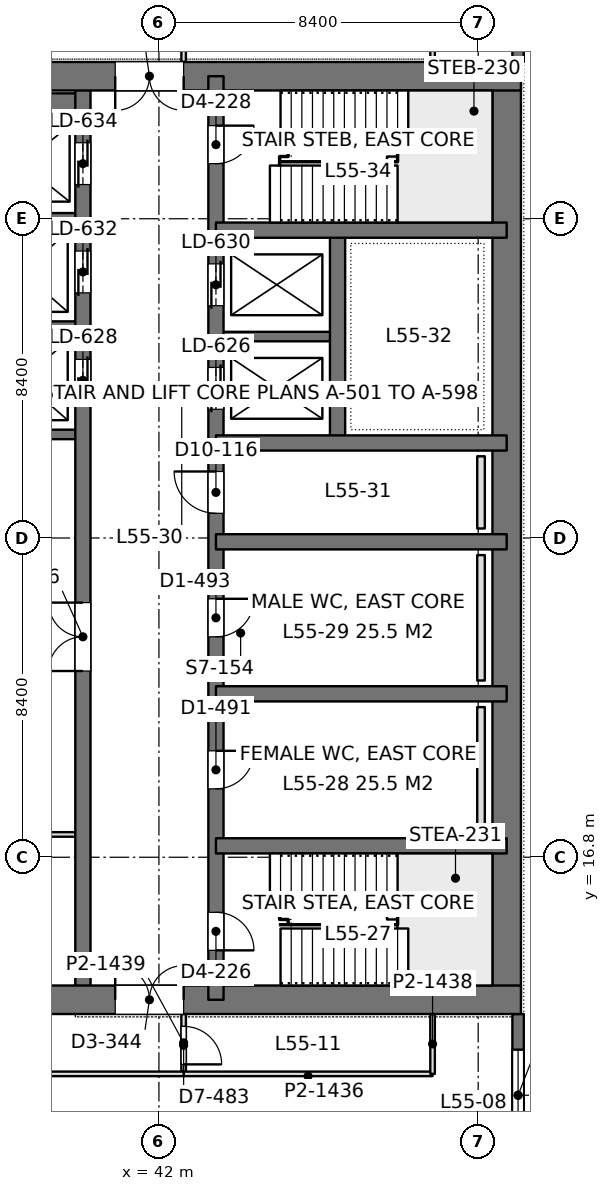
"""IFC4 building model, lengths in metres.
Left out: names, types, materials, properties, quantities, classifications, styles, units other than length and angle.
Written with IfcOpenShell. Run it as: python <this file> out.ifc"""

import sys

from ifc_helpers import new_model, si_unit, direction, frame, frame_2d, origin, place, context, subcontext, project, spatial, rectangle, extrude, element, fill, save


model = new_model("IFC4")
c1 = context("Model", 3, precision=1e-05, world=origin(), true_north=direction((0.0, 1.0)))
c2 = subcontext(c1, "Body", "Model", "MODEL_VIEW")
j1 = project(units=[si_unit("LENGTHUNIT", "METRE"), si_unit("PLANEANGLEUNIT", "RADIAN")], contexts=[c1])
p1 = place(None, origin())
s1 = spatial("IfcSite", under=j1, at=p1, CompositionType="ELEMENT")
p2 = place(p1, origin())
s2 = spatial("IfcBuilding", under=s1, at=p2, CompositionType="ELEMENT")
p3 = place(p2, frame((0.0, 0.0, 240.6)))
s3 = spatial("IfcBuildingStorey", under=s2, at=p3, CompositionType="ELEMENT", Elevation=240.6)
p4 = place(p3, frame((33.675, 13.05, 0.0), z_axis=(0.0, 0.0, 1.0), x_axis=(1.0, 0.0, 0.0)))
e1 = element("IfcWall", 1, at=p4, inside=s3, PredefinedType="SHEAR", context=c2, shape_type="SweptSolid", body=[
    extrude(rectangle(XDim=17.85, YDim=0.75, at=frame_2d((8.925, 0.0))), origin(), (0.0, 0.0, 1.0), 4.2),
])
p5 = place(p4, frame((7.175, 0.0, 0.0)))
e2 = element("IfcOpeningElement", 2, at=p5, cuts=e1, PredefinedType="OPENING", context=c2, shape_type="SweptSolid", body=[
    extrude(rectangle(XDim=1.8, YDim=2.4, at=frame_2d((0.9, 1.2))), frame((0.0, 0.385, 0.0), z_axis=(0.0, -1.0, 0.0), x_axis=(1.0, 0.0, 0.0)), (0.0, 0.0, 1.0), 0.77),
])
p6 = place(p3, frame((33.675, 37.35, 0.0), z_axis=(0.0, 0.0, 1.0), x_axis=(1.0, 0.0, 0.0)))
e3 = element("IfcWall", 3, at=p6, inside=s3, PredefinedType="SHEAR", context=c2, shape_type="SweptSolid", body=[
    extrude(rectangle(XDim=17.85, YDim=0.75, at=frame_2d((8.925, 0.0))), origin(), (0.0, 0.0, 1.0), 4.2),
])
p7 = place(p6, frame((7.175, 0.0, 0.0)))
e4 = element("IfcOpeningElement", 4, at=p7, cuts=e3, PredefinedType="OPENING", context=c2, shape_type="SweptSolid", body=[
    extrude(rectangle(XDim=1.8, YDim=2.4, at=frame_2d((0.9, 1.2))), frame((0.0, 0.385, 0.0), z_axis=(0.0, -1.0, 0.0), x_axis=(1.0, 0.0, 0.0)), (0.0, 0.0, 1.0), 0.77),
])
p8 = place(p3, frame((51.15, 13.05, 0.0), z_axis=(0.0, 0.0, 1.0), x_axis=(0.0, 1.0, 0.0)))
e5 = element("IfcWall", 5, at=p8, inside=s3, PredefinedType="SHEAR", context=c2, shape_type="SweptSolid", body=[
    extrude(rectangle(XDim=24.3, YDim=0.75, at=frame_2d((12.15, 0.0))), origin(), (0.0, 0.0, 1.0), 4.2),
])
p9 = place(p3, frame((43.5, 13.05, 0.0), z_axis=(0.0, 0.0, 1.0), x_axis=(0.0, 1.0, 0.0)))
e6 = element("IfcWall", 6, at=p9, inside=s3, PredefinedType="SHEAR", context=c2, shape_type="SweptSolid", body=[
    extrude(rectangle(XDim=24.3, YDim=0.4, at=frame_2d((12.15, 0.0))), origin(), (0.0, 0.0, 1.0), 4.2),
])
p10 = place(p9, frame((1.3, 0.0, 0.0)))
e7 = element("IfcOpeningElement", 7, at=p10, cuts=e6, PredefinedType="OPENING", context=c2, shape_type="SweptSolid", body=[
    extrude(rectangle(XDim=1.0, YDim=2.2, at=frame_2d((0.5, 1.1))), frame((0.0, 0.21, 0.0), z_axis=(0.0, -1.0, 0.0), x_axis=(1.0, 0.0, 0.0)), (0.0, 0.0, 1.0), 0.42),
])
p11 = place(p9, frame((22.0, 0.0, 0.0)))
e8 = element("IfcOpeningElement", 8, at=p11, cuts=e6, PredefinedType="OPENING", context=c2, shape_type="SweptSolid", body=[
    extrude(rectangle(XDim=1.0, YDim=2.2, at=frame_2d((0.5, 1.1))), frame((0.0, 0.21, 0.0), z_axis=(0.0, -1.0, 0.0), x_axis=(1.0, 0.0, 0.0)), (0.0, 0.0, 1.0), 0.42),
])
p12 = place(p9, frame((5.55, 0.0, 0.0)))
e9 = element("IfcOpeningElement", 9, at=p12, cuts=e6, PredefinedType="OPENING", context=c2, shape_type="SweptSolid", body=[
    extrude(rectangle(XDim=1.0, YDim=2.2, at=frame_2d((0.5, 1.1))), frame((0.0, 0.21, 0.0), z_axis=(0.0, -1.0, 0.0), x_axis=(1.0, 0.0, 0.0)), (0.0, 0.0, 1.0), 0.42),
])
p13 = place(p9, frame((9.55, 0.0, 0.0)))
e10 = element("IfcOpeningElement", 10, at=p13, cuts=e6, PredefinedType="OPENING", context=c2, shape_type="SweptSolid", body=[
    extrude(rectangle(XDim=1.0, YDim=2.2, at=frame_2d((0.5, 1.1))), frame((0.0, 0.21, 0.0), z_axis=(0.0, -1.0, 0.0), x_axis=(1.0, 0.0, 0.0)), (0.0, 0.0, 1.0), 0.42),
])
p14 = place(p9, frame((12.8, 0.0, 0.0)))
e11 = element("IfcOpeningElement", 11, at=p14, cuts=e6, PredefinedType="OPENING", context=c2, shape_type="SweptSolid", body=[
    extrude(rectangle(XDim=1.1, YDim=2.2, at=frame_2d((0.55, 1.1))), frame((0.0, 0.21, 0.0), z_axis=(0.0, -1.0, 0.0), x_axis=(1.0, 0.0, 0.0)), (0.0, 0.0, 1.0), 0.42),
])
p15 = place(p9, frame((15.538, 0.0, 0.0)))
e12 = element("IfcOpeningElement", 12, at=p15, cuts=e6, PredefinedType="OPENING", context=c2, shape_type="SweptSolid", body=[
    extrude(rectangle(XDim=1.1, YDim=2.2, at=frame_2d((0.55, 1.1))), frame((0.0, 0.21, 0.0), z_axis=(0.0, -1.0, 0.0), x_axis=(1.0, 0.0, 0.0)), (0.0, 0.0, 1.0), 0.42),
])
p16 = place(p9, frame((18.262, 0.0, 0.0)))
e13 = element("IfcOpeningElement", 13, at=p16, cuts=e6, PredefinedType="OPENING", context=c2, shape_type="SweptSolid", body=[
    extrude(rectangle(XDim=1.1, YDim=2.2, at=frame_2d((0.55, 1.1))), frame((0.0, 0.21, 0.0), z_axis=(0.0, -1.0, 0.0), x_axis=(1.0, 0.0, 0.0)), (0.0, 0.0, 1.0), 0.42),
])
p17 = place(p3, frame((40.0, 13.05, 0.0), z_axis=(0.0, 0.0, 1.0), x_axis=(0.0, 1.0, 0.0)))
e14 = element("IfcWall", 14, at=p17, inside=s3, PredefinedType="SHEAR", context=c2, shape_type="SweptSolid", body=[
    extrude(rectangle(XDim=24.3, YDim=0.4, at=frame_2d((12.15, 0.0))), origin(), (0.0, 0.0, 1.0), 4.2),
])
p18 = place(p17, frame((15.75, 0.0, 0.0)))
e15 = element("IfcOpeningElement", 15, at=p18, cuts=e14, PredefinedType="OPENING", context=c2, shape_type="SweptSolid", body=[
    extrude(rectangle(XDim=1.1, YDim=2.2, at=frame_2d((0.55, 1.1))), frame((0.0, 0.21, 0.0), z_axis=(0.0, -1.0, 0.0), x_axis=(1.0, 0.0, 0.0)), (0.0, 0.0, 1.0), 0.42),
])
p19 = place(p17, frame((18.6, 0.0, 0.0)))
e16 = element("IfcOpeningElement", 16, at=p19, cuts=e14, PredefinedType="OPENING", context=c2, shape_type="SweptSolid", body=[
    extrude(rectangle(XDim=1.1, YDim=2.2, at=frame_2d((0.55, 1.1))), frame((0.0, 0.21, 0.0), z_axis=(0.0, -1.0, 0.0), x_axis=(1.0, 0.0, 0.0)), (0.0, 0.0, 1.0), 0.42),
])
p20 = place(p17, frame((21.45, 0.0, 0.0)))
e17 = element("IfcOpeningElement", 17, at=p20, cuts=e14, PredefinedType="OPENING", context=c2, shape_type="SweptSolid", body=[
    extrude(rectangle(XDim=1.1, YDim=2.2, at=frame_2d((0.55, 1.1))), frame((0.0, 0.21, 0.0), z_axis=(0.0, -1.0, 0.0), x_axis=(1.0, 0.0, 0.0)), (0.0, 0.0, 1.0), 0.42),
])
p21 = place(p17, frame((8.65, 0.0, 0.0)))
e18 = element("IfcOpeningElement", 18, at=p21, cuts=e14, PredefinedType="OPENING", context=c2, shape_type="SweptSolid", body=[
    extrude(rectangle(XDim=1.8, YDim=2.4, at=frame_2d((0.9, 1.2))), frame((0.0, 0.21, 0.0), z_axis=(0.0, -1.0, 0.0), x_axis=(1.0, 0.0, 0.0)), (0.0, 0.0, 1.0), 0.42),
])
for number, where, z_axis, x_axis in (
    (19, (51.15, 17.1, 0.0), (0.0, 0.0, 1.0), (-1.0, 0.0, 0.0)),
    (20, (51.15, 21.1, 0.0), (0.0, 0.0, 1.0), (-1.0, 0.0, 0.0)),
    (21, (51.15, 25.1, 0.0), (0.0, 0.0, 1.0), (-1.0, 0.0, 0.0)),
    (22, (51.15, 27.7, 0.0), (0.0, 0.0, 1.0), (-1.0, 0.0, 0.0)),
    (23, (51.15, 33.3, 0.0), (0.0, 0.0, 1.0), (-1.0, 0.0, 0.0)),
):
    element("IfcWall", number, at=place(p3, frame(where, z_axis=z_axis, x_axis=x_axis)), inside=s3, PredefinedType="SHEAR", context=c2, shape_type="SweptSolid", body=[
        extrude(rectangle(XDim=7.65, YDim=0.4, at=frame_2d((3.825, 0.0))), origin(), (0.0, 0.0, 1.0), 4.2),
    ])
p22 = place(p3, frame((46.7, 27.7, 0.0), z_axis=(0.0, 0.0, 1.0), x_axis=(0.0, 1.0, 0.0)))
e24 = element("IfcWall", 24, at=p22, inside=s3, PredefinedType="SHEAR", context=c2, shape_type="SweptSolid", body=[
    extrude(rectangle(XDim=5.6, YDim=0.4, at=frame_2d((2.8, 0.0))), origin(), (0.0, 0.0, 1.0), 4.2),
])
p23 = place(p3, frame((46.7, 30.5, 0.0), z_axis=(0.0, 0.0, 1.0), x_axis=(-1.0, 0.0, 0.0)))
e25 = element("IfcWall", 25, at=p23, inside=s3, PredefinedType="SHEAR", context=c2, shape_type="SweptSolid", body=[
    extrude(rectangle(XDim=3.2, YDim=0.25, at=frame_2d((1.6, 0.0))), origin(), (0.0, 0.0, 1.0), 4.2),
])
p24 = place(p3, frame((40.0, 27.925, 0.0), z_axis=(0.0, 0.0, 1.0), x_axis=(-1.0, 0.0, 0.0)))
e26 = element("IfcWall", 26, at=p24, inside=s3, PredefinedType="SHEAR", context=c2, shape_type="SweptSolid", body=[
    extrude(rectangle(XDim=5.95, YDim=0.25, at=frame_2d((2.975, 0.0))), origin(), (0.0, 0.0, 1.0), 4.2),
])
for number, where, z_axis, x_axis in (
    (27, (40.0, 30.775, 0.0), (0.0, 0.0, 1.0), (-1.0, 0.0, 0.0)),
    (28, (40.0, 33.625, 0.0), (0.0, 0.0, 1.0), (-1.0, 0.0, 0.0)),
):
    element("IfcWall", number, at=place(p3, frame(where, z_axis=z_axis, x_axis=x_axis)), inside=s3, PredefinedType="SHEAR", context=c2, shape_type="SweptSolid", body=[
        extrude(rectangle(XDim=3.2, YDim=0.25, at=frame_2d((1.6, 0.0))), origin(), (0.0, 0.0, 1.0), 4.2),
    ])
p25 = place(p3, frame((40.0, 36.625, 0.0), z_axis=(0.0, 0.0, 1.0), x_axis=(-1.0, 0.0, 0.0)))
e29 = element("IfcWall", 29, at=p25, inside=s3, PredefinedType="SHEAR", context=c2, shape_type="SweptSolid", body=[
    extrude(rectangle(XDim=3.2, YDim=0.55, at=frame_2d((1.6, 0.0))), origin(), (0.0, 0.0, 1.0), 4.2),
])
p26 = place(p3, frame((51.45, 42.0, 0.0), z_axis=(0.0, 0.0, 1.0), x_axis=(0.0, -1.0, 0.0)))
e30 = element("IfcWall", 30, at=p26, inside=s3, PredefinedType="SOLIDWALL", context=c2, shape_type="SweptSolid", body=[
    extrude(rectangle(XDim=4.275, YDim=0.3, at=frame_2d((2.137, 0.0))), origin(), (0.0, 0.0, 1.0), 4.0),
])
p27 = place(p26, frame((0.938, 0.0, 0.9)))
e31 = element("IfcOpeningElement", 31, at=p27, cuts=e30, PredefinedType="OPENING", context=c2, shape_type="SweptSolid", body=[
    extrude(rectangle(XDim=2.4, YDim=1.9, at=frame_2d((1.2, 0.95))), frame((0.0, 0.16, 0.0), z_axis=(0.0, -1.0, 0.0), x_axis=(1.0, 0.0, 0.0)), (0.0, 0.0, 1.0), 0.32),
])
p28 = place(p3, frame((51.45, 12.675, 0.0), z_axis=(0.0, 0.0, 1.0), x_axis=(0.0, -1.0, 0.0)))
e32 = element("IfcWall", 32, at=p28, inside=s3, PredefinedType="SOLIDWALL", context=c2, shape_type="SweptSolid", body=[
    extrude(rectangle(XDim=4.275, YDim=0.3, at=frame_2d((2.138, 0.0))), origin(), (0.0, 0.0, 1.0), 4.0),
])
p29 = place(p28, frame((0.938, 0.0, 0.9)))
e33 = element("IfcOpeningElement", 33, at=p29, cuts=e32, PredefinedType="OPENING", context=c2, shape_type="SweptSolid", body=[
    extrude(rectangle(XDim=2.4, YDim=1.9, at=frame_2d((1.2, 0.95))), frame((0.0, 0.16, 0.0), z_axis=(0.0, -1.0, 0.0), x_axis=(1.0, 0.0, 0.0)), (0.0, 0.0, 1.0), 0.32),
])
p30 = place(p3, frame((33.898, 17.4, 0.0), z_axis=(0.0, 0.0, 1.0), x_axis=(1.0, 0.0, 0.0)))
e34 = element("IfcWall", 34, at=p30, inside=s3, PredefinedType="PARTITIONING", context=c2, shape_type="SweptSolid", body=[
    extrude(rectangle(XDim=5.904, YDim=0.12, at=frame_2d((2.952, 0.0))), origin(), (0.0, 0.0, 1.0), 3.3),
])
p31 = place(p3, frame((1.2, 11.1, 0.0), z_axis=(0.0, 0.0, 1.0), x_axis=(1.0, 0.0, 0.0)))
e35 = element("IfcWall", 35, at=p31, inside=s3, PredefinedType="PARTITIONING", context=c2, shape_type="SweptSolid", body=[
    extrude(rectangle(XDim=41.452, YDim=0.12, at=frame_2d((20.726, 0.0))), origin(), (0.0, 0.0, 1.0), 3.3),
])
p32 = place(p31, frame((4.3, 0.0, 0.0)))
e36 = element("IfcOpeningElement", 36, at=p32, cuts=e35, PredefinedType="OPENING", context=c2, shape_type="SweptSolid", body=[
    extrude(rectangle(XDim=1.8, YDim=2.2, at=frame_2d((0.9, 1.1))), frame((0.0, 0.07, 0.0), z_axis=(0.0, -1.0, 0.0), x_axis=(1.0, 0.0, 0.0)), (0.0, 0.0, 1.0), 0.14),
])
p33 = place(p31, frame((9.5, 0.0, 0.0)))
e37 = element("IfcOpeningElement", 37, at=p33, cuts=e35, PredefinedType="OPENING", context=c2, shape_type="SweptSolid", body=[
    extrude(rectangle(XDim=1.8, YDim=2.2, at=frame_2d((0.9, 1.1))), frame((0.0, 0.07, 0.0), z_axis=(0.0, -1.0, 0.0), x_axis=(1.0, 0.0, 0.0)), (0.0, 0.0, 1.0), 0.14),
])
p34 = place(p31, frame((23.317, 0.0, 0.0)))
e38 = element("IfcOpeningElement", 38, at=p34, cuts=e35, PredefinedType="OPENING", context=c2, shape_type="SweptSolid", body=[
    extrude(rectangle(XDim=1.8, YDim=2.2, at=frame_2d((0.9, 1.1))), frame((0.0, 0.07, 0.0), z_axis=(0.0, -1.0, 0.0), x_axis=(1.0, 0.0, 0.0)), (0.0, 0.0, 1.0), 0.14),
])
p35 = place(p31, frame((33.0, 0.0, 0.0)))
e39 = element("IfcOpeningElement", 39, at=p35, cuts=e35, PredefinedType="OPENING", context=c2, shape_type="SweptSolid", body=[
    extrude(rectangle(XDim=1.8, YDim=2.2, at=frame_2d((0.9, 1.1))), frame((0.0, 0.07, 0.0), z_axis=(0.0, -1.0, 0.0), x_axis=(1.0, 0.0, 0.0)), (0.0, 0.0, 1.0), 0.14),
])
p36 = place(p3, frame((42.65, 11.158, 0.0), z_axis=(0.0, 0.0, 1.0), x_axis=(0.0, 1.0, 0.0)))
e40 = element("IfcWall", 40, at=p36, inside=s3, PredefinedType="PARTITIONING", context=c2, shape_type="SweptSolid", body=[
    extrude(rectangle(XDim=1.518, YDim=0.12, at=frame_2d((0.759, 0.0))), origin(), (0.0, 0.0, 1.0), 4.0),
])
p37 = place(p36, frame((0.192, 0.0, 0.0)))
e41 = element("IfcOpeningElement", 41, at=p37, cuts=e40, PredefinedType="OPENING", context=c2, shape_type="SweptSolid", body=[
    extrude(rectangle(XDim=1.0, YDim=2.4, at=frame_2d((0.5, 1.2))), frame((0.0, 0.07, 0.0), z_axis=(0.0, -1.0, 0.0), x_axis=(1.0, 0.0, 0.0)), (0.0, 0.0, 1.0), 0.14),
])
p38 = place(p3, frame((42.648, 11.1, 0.0), z_axis=(0.0, 0.0, 1.0), x_axis=(1.0, 0.0, 0.0)))
e42 = element("IfcWall", 42, at=p38, inside=s3, PredefinedType="PARTITIONING", context=c2, shape_type="SweptSolid", body=[
    extrude(rectangle(XDim=6.552, YDim=0.12, at=frame_2d((3.276, 0.0))), origin(), (0.0, 0.0, 1.0), 4.0),
])
p39 = place(p3, frame((49.2, 11.1, 0.0), z_axis=(0.0, 0.0, 1.0), x_axis=(0.0, 1.0, 0.0)))
e43 = element("IfcWall", 43, at=p39, inside=s3, PredefinedType="PARTITIONING", context=c2, shape_type="SweptSolid", body=[
    extrude(rectangle(XDim=1.576, YDim=0.12, at=frame_2d((0.788, 0.0))), origin(), (0.0, 0.0, 1.0), 4.0),
])
p40 = place(p3, frame((42.65, 37.724, 0.0), z_axis=(0.0, 0.0, 1.0), x_axis=(0.0, 1.0, 0.0)))
e44 = element("IfcWall", 44, at=p40, inside=s3, PredefinedType="PARTITIONING", context=c2, shape_type="SweptSolid", body=[
    extrude(rectangle(XDim=1.518, YDim=0.12, at=frame_2d((0.759, 0.0))), origin(), (0.0, 0.0, 1.0), 4.0),
])
p41 = place(p40, frame((0.326, 0.0, 0.0)))
e45 = element("IfcOpeningElement", 45, at=p41, cuts=e44, PredefinedType="OPENING", context=c2, shape_type="SweptSolid", body=[
    extrude(rectangle(XDim=1.0, YDim=2.4, at=frame_2d((0.5, 1.2))), frame((0.0, 0.07, 0.0), z_axis=(0.0, -1.0, 0.0), x_axis=(1.0, 0.0, 0.0)), (0.0, 0.0, 1.0), 0.14),
])
p42 = place(p3, frame((49.2, 37.724, 0.0), z_axis=(0.0, 0.0, 1.0), x_axis=(0.0, 1.0, 0.0)))
e46 = element("IfcWall", 46, at=p42, inside=s3, PredefinedType="PARTITIONING", context=c2, shape_type="SweptSolid", body=[
    extrude(rectangle(XDim=1.576, YDim=0.12, at=frame_2d((0.788, 0.0))), origin(), (0.0, 0.0, 1.0), 4.0),
])
for number, where, z_axis, x_axis in (
    (47, (50.475, 17.45, 0.0), (0.0, 0.0, 1.0), (0.0, 1.0, 0.0)),
    (48, (50.475, 21.45, 0.0), (0.0, 0.0, 1.0), (0.0, 1.0, 0.0)),
):
    element("IfcWall", number, at=place(p3, frame(where, z_axis=z_axis, x_axis=x_axis)), inside=s3, PredefinedType="PLUMBINGWALL", context=c2, shape_type="SweptSolid", body=[
        extrude(rectangle(XDim=3.3, YDim=0.2, at=frame_2d((1.65, 0.0))), origin(), (0.0, 0.0, 1.0), 1.2),
    ])
p43 = place(p3, frame((50.475, 25.45, 0.0), z_axis=(0.0, 0.0, 1.0), x_axis=(0.0, 1.0, 0.0)))
e49 = element("IfcWall", 49, at=p43, inside=s3, PredefinedType="PLUMBINGWALL", context=c2, shape_type="SweptSolid", body=[
    extrude(rectangle(XDim=1.9, YDim=0.2, at=frame_2d((0.95, 0.0))), origin(), (0.0, 0.0, 1.0), 1.2),
])
p44 = place(p29, origin())
e50 = element("IfcWindow", 50, at=p44, inside=s3, PartitioningType="SINGLE_PANEL", PredefinedType="WINDOW", context=c2, shape_type="SweptSolid", body=[
    extrude(rectangle(XDim=2.4, YDim=1.9, at=frame_2d((1.2, 0.95))), frame((0.0, 0.03, 0.0), z_axis=(0.0, -1.0, 0.0), x_axis=(1.0, 0.0, 0.0)), (0.0, 0.0, 1.0), 0.06),
])
fill(e33, e50)
p45 = place(p5, origin())
e51 = element("IfcDoor", 51, at=p45, inside=s3, OperationType="DOUBLE_DOOR_SINGLE_SWING", PredefinedType="DOOR", context=c2, shape_type="SweptSolid", body=[
    extrude(rectangle(XDim=1.8, YDim=2.4, at=frame_2d((0.9, 1.2))), frame((0.0, 0.025, 0.0), z_axis=(0.0, -1.0, 0.0), x_axis=(1.0, 0.0, 0.0)), (0.0, 0.0, 1.0), 0.05),
])
fill(e2, e51)
p46 = place(p7, frame((1.8, 0.0, 0.0), z_axis=(0.0, 0.0, 1.0), x_axis=(-1.0, 0.0, 0.0)))
e52 = element("IfcDoor", 52, at=p46, inside=s3, OperationType="DOUBLE_DOOR_SINGLE_SWING", PredefinedType="DOOR", context=c2, shape_type="SweptSolid", body=[
    extrude(rectangle(XDim=1.8, YDim=2.4, at=frame_2d((0.9, 1.2))), frame((0.0, 0.025, 0.0), z_axis=(0.0, -1.0, 0.0), x_axis=(1.0, 0.0, 0.0)), (0.0, 0.0, 1.0), 0.05),
])
fill(e4, e52)
p47 = place(p10, frame((1.0, 0.0, 0.0), z_axis=(0.0, 0.0, 1.0), x_axis=(-1.0, 0.0, 0.0)))
e53 = element("IfcDoor", 53, at=p47, inside=s3, OperationType="SINGLE_SWING_RIGHT", PredefinedType="DOOR", context=c2, shape_type="SweptSolid", body=[
    extrude(rectangle(XDim=1.0, YDim=2.2, at=frame_2d((0.5, 1.1))), frame((0.0, 0.025, 0.0), z_axis=(0.0, -1.0, 0.0), x_axis=(1.0, 0.0, 0.0)), (0.0, 0.0, 1.0), 0.05),
])
fill(e7, e53)
p48 = place(p11, frame((1.0, 0.0, 0.0), z_axis=(0.0, 0.0, 1.0), x_axis=(-1.0, 0.0, 0.0)))
e54 = element("IfcDoor", 54, at=p48, inside=s3, OperationType="SINGLE_SWING_LEFT", PredefinedType="DOOR", context=c2, shape_type="SweptSolid", body=[
    extrude(rectangle(XDim=1.0, YDim=2.2, at=frame_2d((0.5, 1.1))), frame((0.0, 0.025, 0.0), z_axis=(0.0, -1.0, 0.0), x_axis=(1.0, 0.0, 0.0)), (0.0, 0.0, 1.0), 0.05),
])
fill(e8, e54)
p49 = place(p12, frame((1.0, 0.0, 0.0), z_axis=(0.0, 0.0, 1.0), x_axis=(-1.0, 0.0, 0.0)))
e55 = element("IfcDoor", 55, at=p49, inside=s3, OperationType="SINGLE_SWING_LEFT", PredefinedType="DOOR", context=c2, shape_type="SweptSolid", body=[
    extrude(rectangle(XDim=1.0, YDim=2.2, at=frame_2d((0.5, 1.1))), frame((0.0, 0.025, 0.0), z_axis=(0.0, -1.0, 0.0), x_axis=(1.0, 0.0, 0.0)), (0.0, 0.0, 1.0), 0.05),
])
fill(e9, e55)
p50 = place(p13, frame((1.0, 0.0, 0.0), z_axis=(0.0, 0.0, 1.0), x_axis=(-1.0, 0.0, 0.0)))
e56 = element("IfcDoor", 56, at=p50, inside=s3, OperationType="SINGLE_SWING_LEFT", PredefinedType="DOOR", context=c2, shape_type="SweptSolid", body=[
    extrude(rectangle(XDim=1.0, YDim=2.2, at=frame_2d((0.5, 1.1))), frame((0.0, 0.025, 0.0), z_axis=(0.0, -1.0, 0.0), x_axis=(1.0, 0.0, 0.0)), (0.0, 0.0, 1.0), 0.05),
])
fill(e10, e56)
p51 = place(p14, origin())
e57 = element("IfcDoor", 57, at=p51, inside=s3, OperationType="SINGLE_SWING_RIGHT", PredefinedType="DOOR", context=c2, shape_type="SweptSolid", body=[
    extrude(rectangle(XDim=1.1, YDim=2.2, at=frame_2d((0.55, 1.1))), frame((0.0, 0.025, 0.0), z_axis=(0.0, -1.0, 0.0), x_axis=(1.0, 0.0, 0.0)), (0.0, 0.0, 1.0), 0.05),
])
fill(e11, e57)
p52 = place(p18, origin())
e58 = element("IfcDoor", 58, at=p52, inside=s3, OperationType="DOUBLE_DOOR_SLIDING", PredefinedType="DOOR", context=c2, shape_type="SweptSolid", body=[
    extrude(rectangle(XDim=1.1, YDim=2.2, at=frame_2d((0.55, 1.1))), frame((0.0, 0.025, 0.0), z_axis=(0.0, -1.0, 0.0), x_axis=(1.0, 0.0, 0.0)), (0.0, 0.0, 1.0), 0.05),
])
fill(e15, e58)
p53 = place(p19, origin())
e59 = element("IfcDoor", 59, at=p53, inside=s3, OperationType="DOUBLE_DOOR_SLIDING", PredefinedType="DOOR", context=c2, shape_type="SweptSolid", body=[
    extrude(rectangle(XDim=1.1, YDim=2.2, at=frame_2d((0.55, 1.1))), frame((0.0, 0.025, 0.0), z_axis=(0.0, -1.0, 0.0), x_axis=(1.0, 0.0, 0.0)), (0.0, 0.0, 1.0), 0.05),
])
fill(e16, e59)
p54 = place(p20, origin())
e60 = element("IfcDoor", 60, at=p54, inside=s3, OperationType="DOUBLE_DOOR_SLIDING", PredefinedType="DOOR", context=c2, shape_type="SweptSolid", body=[
    extrude(rectangle(XDim=1.1, YDim=2.2, at=frame_2d((0.55, 1.1))), frame((0.0, 0.025, 0.0), z_axis=(0.0, -1.0, 0.0), x_axis=(1.0, 0.0, 0.0)), (0.0, 0.0, 1.0), 0.05),
])
fill(e17, e60)
p55 = place(p15, origin())
e61 = element("IfcDoor", 61, at=p55, inside=s3, OperationType="DOUBLE_DOOR_SLIDING", PredefinedType="DOOR", context=c2, shape_type="SweptSolid", body=[
    extrude(rectangle(XDim=1.1, YDim=2.2, at=frame_2d((0.55, 1.1))), frame((0.0, 0.025, 0.0), z_axis=(0.0, -1.0, 0.0), x_axis=(1.0, 0.0, 0.0)), (0.0, 0.0, 1.0), 0.05),
])
fill(e12, e61)
p56 = place(p16, origin())
e62 = element("IfcDoor", 62, at=p56, inside=s3, OperationType="DOUBLE_DOOR_SLIDING", PredefinedType="DOOR", context=c2, shape_type="SweptSolid", body=[
    extrude(rectangle(XDim=1.1, YDim=2.2, at=frame_2d((0.55, 1.1))), frame((0.0, 0.025, 0.0), z_axis=(0.0, -1.0, 0.0), x_axis=(1.0, 0.0, 0.0)), (0.0, 0.0, 1.0), 0.05),
])
fill(e13, e62)
p57 = place(p21, origin())
e63 = element("IfcDoor", 63, at=p57, inside=s3, OperationType="DOUBLE_DOOR_SINGLE_SWING", PredefinedType="DOOR", context=c2, shape_type="SweptSolid", body=[
    extrude(rectangle(XDim=1.8, YDim=2.4, at=frame_2d((0.9, 1.2))), frame((0.0, 0.025, 0.0), z_axis=(0.0, -1.0, 0.0), x_axis=(1.0, 0.0, 0.0)), (0.0, 0.0, 1.0), 0.05),
])
fill(e18, e63)
p58 = place(p37, frame((1.0, 0.0, 0.0), z_axis=(0.0, 0.0, 1.0), x_axis=(-1.0, 0.0, 0.0)))
e64 = element("IfcDoor", 64, at=p58, inside=s3, OperationType="SINGLE_SWING_RIGHT", PredefinedType="DOOR", context=c2, shape_type="SweptSolid", body=[
    extrude(rectangle(XDim=1.0, YDim=2.4, at=frame_2d((0.5, 1.2))), frame((0.0, 0.025, 0.0), z_axis=(0.0, -1.0, 0.0), x_axis=(1.0, 0.0, 0.0)), (0.0, 0.0, 1.0), 0.05),
])
fill(e41, e64)
save(model, sys.argv[1])
